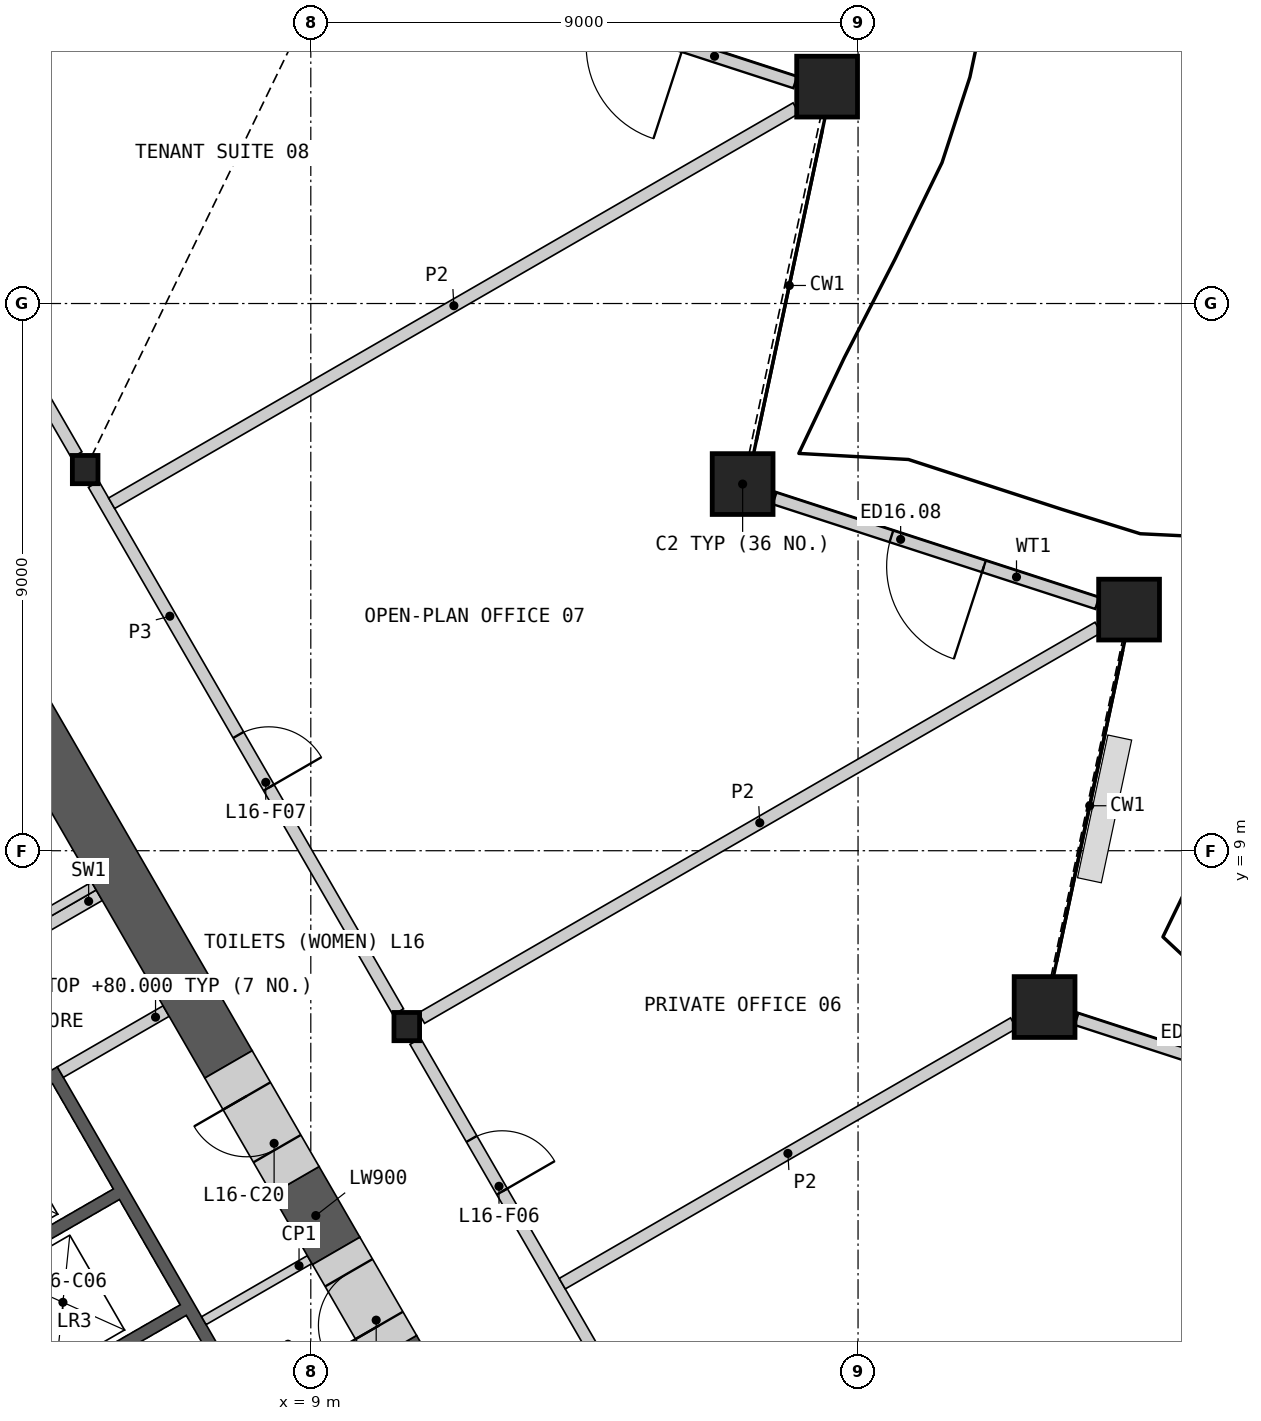
"""IFC4 building model, lengths in metres.
Left out: names, types, materials, properties, quantities, classifications, styles, units other than length and angle.
Written with IfcOpenShell. Run it as: python <this file> out.ifc"""

import sys

from ifc_helpers import new_model, si_unit, direction, frame, frame_2d, origin, origin_2d, place, context, subcontext, project, spatial, polyline, rectangle, hollow_rectangle, i_section, outline, extrude, element, fill, save


model = new_model("IFC4")
c1 = context("Model", 3, precision=1e-05, world=origin(), true_north=direction((0.0, 1.0)))
c2 = subcontext(c1, "Body", "Model", "MODEL_VIEW")
j1 = project(units=[si_unit("LENGTHUNIT", "METRE"), si_unit("PLANEANGLEUNIT", "RADIAN")], contexts=[c1])
p1 = place(None, origin())
s1 = spatial("IfcSite", under=j1, at=p1, CompositionType="ELEMENT")
p2 = place(p1, origin())
s2 = spatial("IfcBuilding", under=s1, at=p2, CompositionType="ELEMENT")
p3 = place(p2, frame((0.0, 0.0, 76.2)))
s3 = spatial("IfcBuildingStorey", under=s2, at=p3, CompositionType="ELEMENT", Elevation=76.2)
for number, where, z_axis, x_axis in (
    (1, (21.068, 6.429, 0.0), (0.0, 0.0, 1.0), (1.0, 0.0, 0.0)),
    (2, (22.457, 12.966, 0.0), (0.0, 0.0, 1.0), (1.0, 0.0, 0.0)),
    (3, (16.102, 15.031, 0.0), (0.0, 0.0, 1.0), (1.0, 0.0, 0.0)),
    (4, (17.491, 21.567, 0.0), (0.0, 0.0, 1.0), (1.0, 0.0, 0.0)),
):
    element("IfcColumn", number, at=place(p3, frame(where, z_axis=z_axis, x_axis=x_axis)), inside=s3, PredefinedType="COLUMN", context=c2, shape_type="SweptSolid", body=[
        extrude(hollow_rectangle(XDim=1.0, YDim=1.0, WallThickness=0.07, at=origin_2d()), origin(), (0.0, 0.0, 1.0), 4.2),
    ])
for number, where, z_axis, x_axis in (
    (5, (10.578, 6.107, 0.0), (0.0, 0.0, 1.0), (1.0, 0.0, 0.0)),
    (6, (5.289, 15.269, 0.0), (0.0, 0.0, 1.0), (1.0, 0.0, 0.0)),
):
    element("IfcColumn", number, at=place(p3, frame(where, z_axis=z_axis, x_axis=x_axis)), inside=s3, PredefinedType="COLUMN", context=c2, shape_type="SweptSolid", body=[
        extrude(i_section(OverallWidth=0.421, OverallDepth=0.465, WebThickness=0.045, FlangeThickness=0.072, at=origin_2d()), origin(), (0.0, 0.0, 1.0), 4.2),
    ])
p4 = place(p3, frame((26.899, 4.505, 0.0), z_axis=(0.0, 0.0, 1.0), x_axis=(-0.951054004345, 0.309024725255, 0.0)))
e7 = element("IfcWall", 7, at=p4, inside=s3, PredefinedType="SOLIDWALL", context=c2, shape_type="SweptSolid", body=[
    extrude(rectangle(XDim=5.579, YDim=0.2, at=frame_2d((2.79, 0.0))), origin(), (0.0, 0.0, 1.0), 3.189),
])
p5 = place(p4, frame((1.985, 0.0, 0.0)))
e8 = element("IfcOpeningElement", 8, at=p5, cuts=e7, PredefinedType="OPENING", context=c2, shape_type="SweptSolid", body=[
    extrude(rectangle(XDim=1.6, YDim=2.4, at=frame_2d((0.8, 1.2))), frame((0.0, 0.11, 0.0), z_axis=(0.0, -1.0, 0.0), x_axis=(1.0, 0.0, 0.0)), (0.0, 0.0, 1.0), 0.22),
])
p6 = place(p3, frame((21.933, 13.071, 0.0), z_axis=(0.0, 0.0, 1.0), x_axis=(-0.951054004345, 0.309024725255, 0.0)))
e9 = element("IfcWall", 9, at=p6, inside=s3, PredefinedType="SOLIDWALL", context=c2, shape_type="SweptSolid", body=[
    extrude(rectangle(XDim=5.579, YDim=0.2, at=frame_2d((2.79, 0.0))), origin(), (0.0, 0.0, 1.0), 3.189),
])
p7 = place(p6, frame((1.958, 0.0, 0.0)))
e10 = element("IfcOpeningElement", 10, at=p7, cuts=e9, PredefinedType="OPENING", context=c2, shape_type="SweptSolid", body=[
    extrude(rectangle(XDim=1.6, YDim=2.4, at=frame_2d((0.8, 1.2))), frame((0.0, 0.11, 0.0), z_axis=(0.0, -1.0, 0.0), x_axis=(1.0, 0.0, 0.0)), (0.0, 0.0, 1.0), 0.22),
])
p8 = place(p3, frame((16.967, 21.636, 0.0), z_axis=(0.0, 0.0, 1.0), x_axis=(-0.951054004345, 0.309024725255, 0.0)))
e11 = element("IfcWall", 11, at=p8, inside=s3, PredefinedType="SOLIDWALL", context=c2, shape_type="SweptSolid", body=[
    extrude(rectangle(XDim=5.579, YDim=0.2, at=frame_2d((2.79, 0.0))), origin(), (0.0, 0.0, 1.0), 3.189),
])
p9 = place(p8, frame((1.931, 0.0, 0.0)))
e12 = element("IfcOpeningElement", 12, at=p9, cuts=e11, PredefinedType="OPENING", context=c2, shape_type="SweptSolid", body=[
    extrude(rectangle(XDim=1.6, YDim=2.4, at=frame_2d((0.8, 1.2))), frame((0.0, 0.11, 0.0), z_axis=(0.0, -1.0, 0.0), x_axis=(1.0, 0.0, 0.0)), (0.0, 0.0, 1.0), 0.22),
])
p10 = place(p3, origin())
e13 = element("IfcWall", 13, at=p10, inside=s3, PredefinedType="SHEAR", context=c2, shape_type="SweptSolid", body=[
    extrude(outline(polyline([(2.66, 4.192), (4.831, 5.445), (8.231, -0.444), (6.061, -1.697), (5.96, -1.524), (7.952, -0.374), (6.952, 1.358), (4.96, 0.208), (4.861, 0.381), (6.852, 1.531), (5.852, 3.263), (3.861, 2.113), (3.76, 2.287), (5.752, 3.437), (4.752, 5.169), (2.76, 4.019), (2.66, 4.192)])), origin(), (0.0, 0.0, 1.0), 3.8),
])
p11 = place(p3, frame((5.817, -1.476, 0.0), z_axis=(0.0, 0.0, 1.0), x_axis=(-0.500002616675, 0.866023893041, 0.0)))
e14 = element("IfcWall", 14, at=p11, inside=s3, PredefinedType="SOLIDWALL", context=c2, shape_type="SweptSolid", body=[
    extrude(rectangle(XDim=8.373, YDim=0.2, at=frame_2d((4.187, 0.0))), origin(), (0.0, 0.0, 1.0), 3.8),
])
p12 = place(p11, frame((0.337, 0.0, 0.0)))
e15 = element("IfcOpeningElement", 15, at=p12, cuts=e14, PredefinedType="OPENING", context=c2, shape_type="SweptSolid", body=[
    extrude(rectangle(XDim=1.1, YDim=2.1, at=frame_2d((0.55, 1.05))), frame((0.0, 0.11, 0.0), z_axis=(0.0, -1.0, 0.0), x_axis=(1.0, 0.0, 0.0)), (0.0, 0.0, 1.0), 0.22),
])
p13 = place(p11, frame((2.537, 0.0, 0.0)))
e16 = element("IfcOpeningElement", 16, at=p13, cuts=e14, PredefinedType="OPENING", context=c2, shape_type="SweptSolid", body=[
    extrude(rectangle(XDim=1.1, YDim=2.1, at=frame_2d((0.55, 1.05))), frame((0.0, 0.11, 0.0), z_axis=(0.0, -1.0, 0.0), x_axis=(1.0, 0.0, 0.0)), (0.0, 0.0, 1.0), 0.22),
])
p14 = place(p11, frame((4.737, 0.0, 0.0)))
e17 = element("IfcOpeningElement", 17, at=p14, cuts=e14, PredefinedType="OPENING", context=c2, shape_type="SweptSolid", body=[
    extrude(rectangle(XDim=1.1, YDim=2.1, at=frame_2d((0.55, 1.05))), frame((0.0, 0.11, 0.0), z_axis=(0.0, -1.0, 0.0), x_axis=(1.0, 0.0, 0.0)), (0.0, 0.0, 1.0), 0.22),
])
p15 = place(p11, frame((7.037, 0.0, 0.0)))
e18 = element("IfcOpeningElement", 18, at=p15, cuts=e14, PredefinedType="OPENING", context=c2, shape_type="SweptSolid", body=[
    extrude(rectangle(XDim=0.9, YDim=2.1, at=frame_2d((0.45, 1.05))), frame((0.0, 0.11, 0.0), z_axis=(0.0, -1.0, 0.0), x_axis=(1.0, 0.0, 0.0)), (0.0, 0.0, 1.0), 0.22),
])
p16 = place(p3, frame((4.881, 5.358, 0.0), z_axis=(0.0, 0.0, 1.0), x_axis=(0.866035824272, 0.499981950752, 0.0)))
e19 = element("IfcWall", 19, at=p16, inside=s3, PredefinedType="SHEAR", context=c2, shape_type="SweptSolid", body=[
    extrude(rectangle(XDim=2.009, YDim=0.2, at=frame_2d((1.004, 0.0))), origin(), (0.0, 0.0, 1.0), 3.8),
])
p17 = place(p3, frame((3.781, 7.263, 0.0), z_axis=(0.0, 0.0, 1.0), x_axis=(0.865983199114, 0.50007309351, 0.0)))
e20 = element("IfcWall", 20, at=p17, inside=s3, PredefinedType="SHEAR", context=c2, shape_type="SweptSolid", body=[
    extrude(rectangle(XDim=2.009, YDim=0.2, at=frame_2d((1.004, 0.0))), origin(), (0.0, 0.0, 1.0), 3.8),
])
p18 = place(p3, frame((3.693, 7.415, 0.0), z_axis=(0.0, 0.0, 1.0), x_axis=(0.866035824272, 0.499981950752, 0.0)))
e21 = element("IfcWall", 21, at=p18, inside=s3, PredefinedType="PARTITIONING", context=c2, shape_type="SweptSolid", body=[
    extrude(rectangle(XDim=2.009, YDim=0.15, at=frame_2d((1.004, 0.0))), origin(), (0.0, 0.0, 1.0), 3.8),
])
p19 = place(p3, frame((8.981, 2.275, 0.0), z_axis=(0.0, 0.0, 1.0), x_axis=(-0.866013584312, -0.500020471368, 0.0)))
e22 = element("IfcWall", 22, at=p19, inside=s3, PredefinedType="PARTITIONING", context=c2, shape_type="SweptSolid", body=[
    extrude(rectangle(XDim=2.009, YDim=0.15, at=frame_2d((1.005, 0.0))), origin(), (0.0, 0.0, 1.0), 3.8),
])
p20 = place(p3, frame((7.646, 5.486, 0.0), z_axis=(0.0, 0.0, 1.0), x_axis=(-0.499982660725, 0.866035414388, 0.0)))
e23 = element("IfcWall", 23, at=p20, inside=s3, PredefinedType="SHEAR", context=c2, shape_type="SweptSolid", body=[
    extrude(rectangle(XDim=10.206, YDim=0.9, at=frame_2d((5.103, 0.0))), origin(), (0.0, 0.0, 1.0), 3.8),
])
p21 = place(p3, frame((11.755, -1.63, 0.0), z_axis=(0.0, 0.0, 1.0), x_axis=(-0.499943114462, 0.866058244174, 0.0)))
e24 = element("IfcWall", 24, at=p21, inside=s3, PredefinedType="SHEAR", context=c2, shape_type="SweptSolid", body=[
    extrude(rectangle(XDim=2.809, YDim=0.9, at=frame_2d((1.405, 0.0))), origin(), (0.0, 0.0, 1.0), 3.8),
])
p22 = place(p3, frame((9.418, 2.418, 0.0), z_axis=(0.0, 0.0, 1.0), x_axis=(-0.49995335277, 0.8660523339, 0.0)))
e25 = element("IfcWall", 25, at=p22, inside=s3, PredefinedType="SHEAR", context=c2, shape_type="SweptSolid", body=[
    extrude(rectangle(XDim=1.343, YDim=0.9, at=frame_2d((0.671, 0.0))), origin(), (0.0, 0.0, 1.0), 3.8),
])
p23 = place(p3, frame((10.35, 0.803, 0.0), z_axis=(0.0, 0.0, 1.0), x_axis=(-0.500081290722, 0.865978465477, 0.0)))
e26 = element("IfcWall", 26, at=p23, inside=s3, PredefinedType="SHEAR", context=c2, shape_type="SweptSolid", body=[
    extrude(rectangle(XDim=1.865, YDim=0.9, at=frame_2d((0.933, 0.0))), origin(), (0.0, 0.0, 1.0), 3.8),
])
p24 = place(p23, frame((0.45, 0.0, 0.0)))
e27 = element("IfcOpeningElement", 27, at=p24, cuts=e26, PredefinedType="OPENING", context=c2, shape_type="SweptSolid", body=[
    extrude(rectangle(XDim=1.0, YDim=2.1, at=frame_2d((0.5, 1.05))), frame((0.0, 0.46, 0.0), z_axis=(0.0, -1.0, 0.0), x_axis=(1.0, 0.0, 0.0)), (0.0, 0.0, 1.0), 0.92),
])
p25 = place(p3, frame((8.747, 3.58, 0.0), z_axis=(0.0, 0.0, 1.0), x_axis=(-0.50002983664, 0.866008176907, 0.0)))
e28 = element("IfcWall", 28, at=p25, inside=s3, PredefinedType="SHEAR", context=c2, shape_type="SweptSolid", body=[
    extrude(rectangle(XDim=2.2, YDim=0.9, at=frame_2d((1.1, 0.0))), origin(), (0.0, 0.0, 1.0), 3.8),
])
p26 = place(p25, frame((0.6, 0.0, 0.0)))
e29 = element("IfcOpeningElement", 29, at=p26, cuts=e28, PredefinedType="OPENING", context=c2, shape_type="SweptSolid", body=[
    extrude(rectangle(XDim=1.0, YDim=2.1, at=frame_2d((0.5, 1.05))), frame((0.0, 0.46, 0.0), z_axis=(0.0, -1.0, 0.0), x_axis=(1.0, 0.0, 0.0)), (0.0, 0.0, 1.0), 0.92),
])
p27 = place(p3, frame((5.429, 15.026, 0.0), z_axis=(0.0, 0.0, 1.0), x_axis=(0.50001002959, -0.86601961312, 0.0)))
e30 = element("IfcWall", 30, at=p27, inside=s3, PredefinedType="PARTITIONING", context=c2, shape_type="SweptSolid", body=[
    extrude(rectangle(XDim=10.019, YDim=0.2, at=frame_2d((5.009, 0.0))), origin(), (0.0, 0.0, 1.0), 3.8),
])
p28 = place(p27, frame((4.76, 0.0, 0.0)))
e31 = element("IfcOpeningElement", 31, at=p28, cuts=e30, PredefinedType="OPENING", context=c2, shape_type="SweptSolid", body=[
    extrude(rectangle(XDim=1.0, YDim=2.1, at=frame_2d((0.5, 1.05))), frame((0.0, 0.11, 0.0), z_axis=(0.0, -1.0, 0.0), x_axis=(1.0, 0.0, 0.0)), (0.0, 0.0, 1.0), 0.22),
])
p29 = place(p3, frame((10.719, 5.865, 0.0), z_axis=(0.0, 0.0, 1.0), x_axis=(0.49999175339, -0.866030164915, 0.0)))
e32 = element("IfcWall", 32, at=p29, inside=s3, PredefinedType="PARTITIONING", context=c2, shape_type="SweptSolid", body=[
    extrude(rectangle(XDim=10.019, YDim=0.2, at=frame_2d((5.009, 0.0))), origin(), (0.0, 0.0, 1.0), 3.8),
])
p30 = place(p29, frame((1.854, 0.0, 0.0)))
e33 = element("IfcOpeningElement", 33, at=p30, cuts=e32, PredefinedType="OPENING", context=c2, shape_type="SweptSolid", body=[
    extrude(rectangle(XDim=1.0, YDim=2.1, at=frame_2d((0.5, 1.05))), frame((0.0, 0.11, 0.0), z_axis=(0.0, -1.0, 0.0), x_axis=(1.0, 0.0, 0.0)), (0.0, 0.0, 1.0), 0.22),
])
p31 = place(p3, frame((1.913, 21.116, 0.0), z_axis=(0.0, 0.0, 1.0), x_axis=(0.500001069878, -0.866024786089, 0.0)))
e34 = element("IfcWall", 34, at=p31, inside=s3, PredefinedType="PARTITIONING", context=c2, shape_type="SweptSolid", body=[
    extrude(rectangle(XDim=6.473, YDim=0.2, at=frame_2d((3.236, 0.0))), origin(), (0.0, 0.0, 1.0), 3.8),
])
p32 = place(p31, frame((2.787, 0.0, 0.0)))
e35 = element("IfcOpeningElement", 35, at=p32, cuts=e34, PredefinedType="OPENING", context=c2, shape_type="SweptSolid", body=[
    extrude(rectangle(XDim=1.0, YDim=2.1, at=frame_2d((0.5, 1.05))), frame((0.0, 0.11, 0.0), z_axis=(0.0, -1.0, 0.0), x_axis=(1.0, 0.0, 0.0)), (0.0, 0.0, 1.0), 0.22),
])
p33 = place(p3, frame((2.039, 21.095, 0.0), z_axis=(0.0, 0.0, 1.0), x_axis=(0.761767039776, 0.647851045465, 0.0)))
e36 = element("IfcWall", 36, at=p33, inside=s3, PredefinedType="PARTITIONING", context=c2, shape_type="SweptSolid", body=[
    extrude(rectangle(XDim=13.219, YDim=0.2, at=frame_2d((6.609, 0.0))), origin(), (0.0, 0.0, 1.0), 2.885),
])
p34 = place(p3, frame((5.725, 14.715, 0.0), z_axis=(0.0, 0.0, 1.0), x_axis=(0.866032633092, 0.499987478263, 0.0)))
e37 = element("IfcWall", 37, at=p34, inside=s3, PredefinedType="PARTITIONING", context=c2, shape_type="SweptSolid", body=[
    extrude(rectangle(XDim=12.998, YDim=0.2, at=frame_2d((6.499, 0.0))), origin(), (0.0, 0.0, 1.0), 2.885),
])
p35 = place(p3, frame((10.821, 6.247, 0.0), z_axis=(0.0, 0.0, 1.0), x_axis=(0.866026729935, 0.499997703033, 0.0)))
e38 = element("IfcWall", 38, at=p35, inside=s3, PredefinedType="PARTITIONING", context=c2, shape_type="SweptSolid", body=[
    extrude(rectangle(XDim=12.848, YDim=0.2, at=frame_2d((6.424, 0.0))), origin(), (0.0, 0.0, 1.0), 2.885),
])
p36 = place(p3, frame((13.135, 1.879, 0.0), z_axis=(0.0, 0.0, 1.0), x_axis=(0.866027626846, 0.499996149525, 0.0)))
e39 = element("IfcWall", 39, at=p36, inside=s3, PredefinedType="PARTITIONING", context=c2, shape_type="SweptSolid", body=[
    extrude(rectangle(XDim=8.571, YDim=0.2, at=frame_2d((4.285, 0.0))), origin(), (0.0, 0.0, 1.0), 2.885),
])
p37 = place(p7, origin())
e40 = element("IfcDoor", 40, at=p37, inside=s3, OperationType="DOUBLE_DOOR_SINGLE_SWING", PredefinedType="DOOR", context=c2, shape_type="SweptSolid", body=[
    extrude(rectangle(XDim=1.6, YDim=2.4, at=frame_2d((0.8, 1.2))), frame((0.0, 0.025, 0.0), z_axis=(0.0, -1.0, 0.0), x_axis=(1.0, 0.0, 0.0)), (0.0, 0.0, 1.0), 0.05),
])
fill(e10, e40)
p38 = place(p24, origin())
e41 = element("IfcDoor", 41, at=p38, inside=s3, OperationType="SINGLE_SWING_LEFT", PredefinedType="DOOR", context=c2, shape_type="SweptSolid", body=[
    extrude(rectangle(XDim=1.0, YDim=2.1, at=frame_2d((0.5, 1.05))), frame((0.0, 0.205, 0.0), z_axis=(0.0, -1.0, 0.0), x_axis=(1.0, 0.0, 0.0)), (0.0, 0.0, 1.0), 0.05),
])
fill(e27, e41)
p39 = place(p26, origin())
e42 = element("IfcDoor", 42, at=p39, inside=s3, OperationType="SINGLE_SWING_RIGHT", PredefinedType="DOOR", context=c2, shape_type="SweptSolid", body=[
    extrude(rectangle(XDim=1.0, YDim=2.1, at=frame_2d((0.5, 1.05))), frame((0.0, 0.205, 0.0), z_axis=(0.0, -1.0, 0.0), x_axis=(1.0, 0.0, 0.0)), (0.0, 0.0, 1.0), 0.05),
])
fill(e29, e42)
p40 = place(p30, origin())
e43 = element("IfcDoor", 43, at=p40, inside=s3, OperationType="SINGLE_SWING_RIGHT", PredefinedType="DOOR", context=c2, shape_type="SweptSolid", body=[
    extrude(rectangle(XDim=1.0, YDim=2.1, at=frame_2d((0.5, 1.05))), frame((0.0, 0.025, 0.0), z_axis=(0.0, -1.0, 0.0), x_axis=(1.0, 0.0, 0.0)), (0.0, 0.0, 1.0), 0.05),
])
fill(e33, e43)
p41 = place(p28, origin())
e44 = element("IfcDoor", 44, at=p41, inside=s3, OperationType="SINGLE_SWING_RIGHT", PredefinedType="DOOR", context=c2, shape_type="SweptSolid", body=[
    extrude(rectangle(XDim=1.0, YDim=2.1, at=frame_2d((0.5, 1.05))), frame((0.0, 0.025, 0.0), z_axis=(0.0, -1.0, 0.0), x_axis=(1.0, 0.0, 0.0)), (0.0, 0.0, 1.0), 0.05),
])
fill(e31, e44)
save(model, sys.argv[1])
